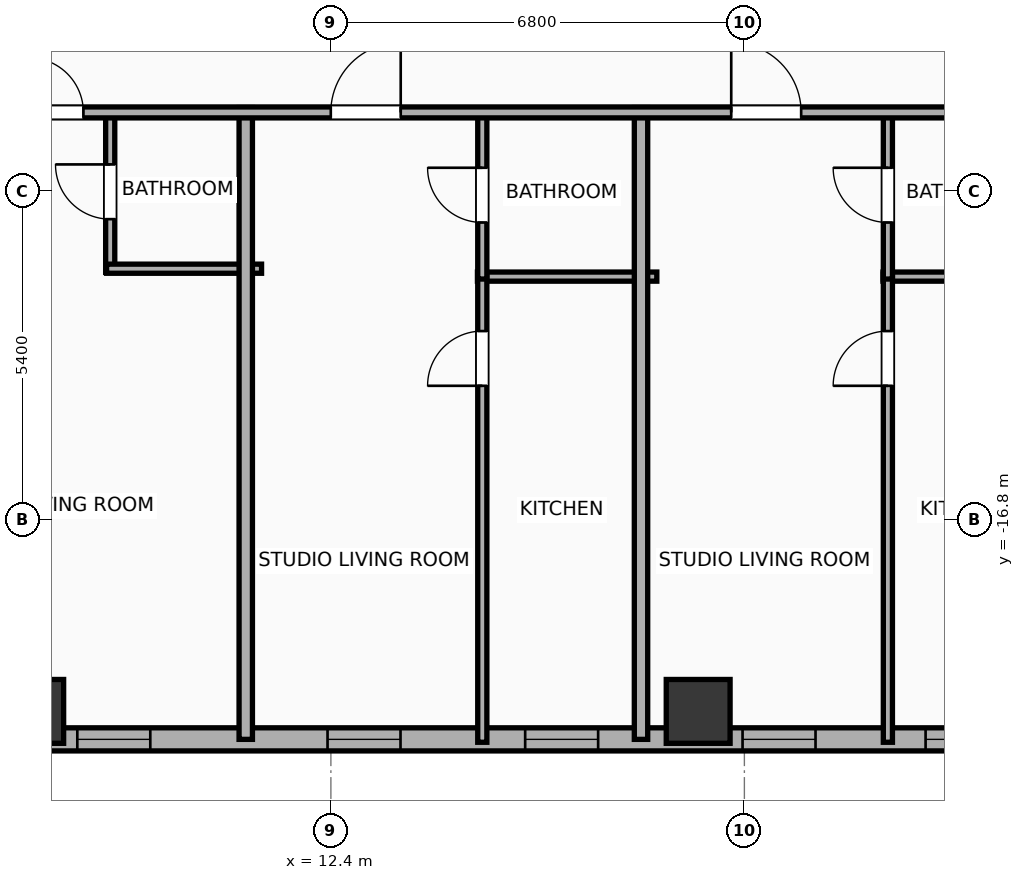
"""IFC4 building model, lengths in metres.
Left out: names, types, materials, properties, quantities, classifications, styles, units other than length and angle.
Written with IfcOpenShell. Run it as: python <this file> out.ifc"""

import sys

from ifc_helpers import new_model, si_unit, direction, frame, frame_2d, origin, origin_2d, place, context, subcontext, project, spatial, rectangle, hollow_rectangle, extrude, element, fill, save


model = new_model("IFC4")
c1 = context("Model", 3, precision=1e-05, world=origin(), true_north=direction((0.0, 1.0)))
c2 = subcontext(c1, "Body", "Model", "MODEL_VIEW")
j1 = project(units=[si_unit("LENGTHUNIT", "METRE"), si_unit("PLANEANGLEUNIT", "RADIAN")], contexts=[c1])
p1 = place(None, origin())
s1 = spatial("IfcSite", under=j1, at=p1, CompositionType="ELEMENT")
p2 = place(p1, origin())
s2 = spatial("IfcBuilding", under=s1, at=p2, CompositionType="ELEMENT")
p3 = place(p2, frame((0.0, 0.0, 128.7)))
s3 = spatial("IfcBuildingStorey", under=s2, at=p3, CompositionType="ELEMENT", Elevation=128.7)
for number, where, z_axis, x_axis in (
    (1, (7.48, -19.95, 0.0), (0.0, 0.0, 1.0), (1.0, 0.0, 0.0)),
    (2, (18.44, -19.95, 0.0), (0.0, 0.0, 1.0), (1.0, 0.0, 0.0)),
):
    element("IfcColumn", number, at=place(p3, frame(where, z_axis=z_axis, x_axis=x_axis)), inside=s3, PredefinedType="COLUMN", context=c2, shape_type="SweptSolid", body=[
        extrude(hollow_rectangle(XDim=1.05, YDim=1.05, WallThickness=0.036, at=origin_2d()), origin(), (0.0, 0.0, 1.0), 3.9),
    ])
p4 = place(p3, frame((29.381, -20.41, 0.0), z_axis=(0.0, 0.0, 1.0), x_axis=(-1.0, 0.0, 0.0)))
e3 = element("IfcWall", 3, at=p4, inside=s3, PredefinedType="ELEMENTEDWALL", context=c2, shape_type="SweptSolid", body=[
    extrude(rectangle(XDim=54.763, YDim=0.38, at=frame_2d((27.381, 0.0))), origin(), (0.0, 0.0, 1.0), 3.65),
])
p5 = place(p4, frame((45.067, 0.0, 0.75)))
e4 = element("IfcOpeningElement", 4, at=p5, cuts=e3, PredefinedType="OPENING", context=c2, shape_type="SweptSolid", body=[
    extrude(rectangle(XDim=2.4, YDim=2.1, at=frame_2d((1.2, 1.05))), frame((0.0, 0.2, 0.0), z_axis=(0.0, -1.0, 0.0), x_axis=(1.0, 0.0, 0.0)), (0.0, 0.0, 1.0), 0.4),
])
p6 = place(p4, frame((51.777, 0.0, 0.75)))
e5 = element("IfcOpeningElement", 5, at=p6, cuts=e3, PredefinedType="OPENING", context=c2, shape_type="SweptSolid", body=[
    extrude(rectangle(XDim=1.2, YDim=2.05, at=frame_2d((0.6, 1.025))), frame((0.0, 0.2, 0.0), z_axis=(0.0, -1.0, 0.0), x_axis=(1.0, 0.0, 0.0)), (0.0, 0.0, 1.0), 0.4),
])
p7 = place(p4, frame((48.976, 0.0, 0.75)))
e6 = element("IfcOpeningElement", 6, at=p7, cuts=e3, PredefinedType="OPENING", context=c2, shape_type="SweptSolid", body=[
    extrude(rectangle(XDim=1.2, YDim=2.05, at=frame_2d((0.6, 1.025))), frame((0.0, 0.2, 0.0), z_axis=(0.0, -1.0, 0.0), x_axis=(1.0, 0.0, 0.0)), (0.0, 0.0, 1.0), 0.4),
])
p8 = place(p4, frame((40.531, 0.0, 0.75)))
e7 = element("IfcOpeningElement", 7, at=p8, cuts=e3, PredefinedType="OPENING", context=c2, shape_type="SweptSolid", body=[
    extrude(rectangle(XDim=1.2, YDim=2.05, at=frame_2d((0.6, 1.025))), frame((0.0, 0.2, 0.0), z_axis=(0.0, -1.0, 0.0), x_axis=(1.0, 0.0, 0.0)), (0.0, 0.0, 1.0), 0.4),
])
p9 = place(p4, frame((33.686, 0.0, 0.75)))
e8 = element("IfcOpeningElement", 8, at=p9, cuts=e3, PredefinedType="OPENING", context=c2, shape_type="SweptSolid", body=[
    extrude(rectangle(XDim=1.2, YDim=2.05, at=frame_2d((0.6, 1.025))), frame((0.0, 0.2, 0.0), z_axis=(0.0, -1.0, 0.0), x_axis=(1.0, 0.0, 0.0)), (0.0, 0.0, 1.0), 0.4),
])
p10 = place(p4, frame((35.976, 0.0, 0.75)))
e9 = element("IfcOpeningElement", 9, at=p10, cuts=e3, PredefinedType="OPENING", context=c2, shape_type="SweptSolid", body=[
    extrude(rectangle(XDim=1.2, YDim=2.05, at=frame_2d((0.6, 1.025))), frame((0.0, 0.2, 0.0), z_axis=(0.0, -1.0, 0.0), x_axis=(1.0, 0.0, 0.0)), (0.0, 0.0, 1.0), 0.4),
])
p11 = place(p4, frame((28.805, 0.0, 0.75)))
e10 = element("IfcOpeningElement", 10, at=p11, cuts=e3, PredefinedType="OPENING", context=c2, shape_type="SweptSolid", body=[
    extrude(rectangle(XDim=1.2, YDim=2.05, at=frame_2d((0.6, 1.025))), frame((0.0, 0.2, 0.0), z_axis=(0.0, -1.0, 0.0), x_axis=(1.0, 0.0, 0.0)), (0.0, 0.0, 1.0), 0.4),
])
p12 = place(p4, frame((25.555, 0.0, 0.75)))
e11 = element("IfcOpeningElement", 11, at=p12, cuts=e3, PredefinedType="OPENING", context=c2, shape_type="SweptSolid", body=[
    extrude(rectangle(XDim=1.2, YDim=2.05, at=frame_2d((0.6, 1.025))), frame((0.0, 0.2, 0.0), z_axis=(0.0, -1.0, 0.0), x_axis=(1.0, 0.0, 0.0)), (0.0, 0.0, 1.0), 0.4),
])
p13 = place(p4, frame((19.951, 0.0, 0.75)))
e12 = element("IfcOpeningElement", 12, at=p13, cuts=e3, PredefinedType="OPENING", context=c2, shape_type="SweptSolid", body=[
    extrude(rectangle(XDim=1.2, YDim=2.05, at=frame_2d((0.6, 1.025))), frame((0.0, 0.2, 0.0), z_axis=(0.0, -1.0, 0.0), x_axis=(1.0, 0.0, 0.0)), (0.0, 0.0, 1.0), 0.4),
])
p14 = place(p4, frame((15.836, 0.0, 0.75)))
e13 = element("IfcOpeningElement", 13, at=p14, cuts=e3, PredefinedType="OPENING", context=c2, shape_type="SweptSolid", body=[
    extrude(rectangle(XDim=1.2, YDim=2.05, at=frame_2d((0.6, 1.025))), frame((0.0, 0.2, 0.0), z_axis=(0.0, -1.0, 0.0), x_axis=(1.0, 0.0, 0.0)), (0.0, 0.0, 1.0), 0.4),
])
p15 = place(p4, frame((12.586, 0.0, 0.75)))
e14 = element("IfcOpeningElement", 14, at=p15, cuts=e3, PredefinedType="OPENING", context=c2, shape_type="SweptSolid", body=[
    extrude(rectangle(XDim=1.2, YDim=2.05, at=frame_2d((0.6, 1.025))), frame((0.0, 0.2, 0.0), z_axis=(0.0, -1.0, 0.0), x_axis=(1.0, 0.0, 0.0)), (0.0, 0.0, 1.0), 0.4),
])
p16 = place(p4, frame((9.011, 0.0, 0.75)))
e15 = element("IfcOpeningElement", 15, at=p16, cuts=e3, PredefinedType="OPENING", context=c2, shape_type="SweptSolid", body=[
    extrude(rectangle(XDim=1.2, YDim=2.05, at=frame_2d((0.6, 1.025))), frame((0.0, 0.2, 0.0), z_axis=(0.0, -1.0, 0.0), x_axis=(1.0, 0.0, 0.0)), (0.0, 0.0, 1.0), 0.4),
])
p17 = place(p4, frame((6.001, 0.0, 0.75)))
e16 = element("IfcOpeningElement", 16, at=p17, cuts=e3, PredefinedType="OPENING", context=c2, shape_type="SweptSolid", body=[
    extrude(rectangle(XDim=1.2, YDim=2.05, at=frame_2d((0.6, 1.025))), frame((0.0, 0.2, 0.0), z_axis=(0.0, -1.0, 0.0), x_axis=(1.0, 0.0, 0.0)), (0.0, 0.0, 1.0), 0.4),
])
p18 = place(p4, frame((2.536, 0.0, 0.75)))
e17 = element("IfcOpeningElement", 17, at=p18, cuts=e3, PredefinedType="OPENING", context=c2, shape_type="SweptSolid", body=[
    extrude(rectangle(XDim=1.2, YDim=2.05, at=frame_2d((0.6, 1.025))), frame((0.0, 0.2, 0.0), z_axis=(0.0, -1.0, 0.0), x_axis=(1.0, 0.0, 0.0)), (0.0, 0.0, 1.0), 0.4),
])
p19 = place(p3, frame((8.771, -12.73, 0.0), z_axis=(0.0, 0.0, 1.0), x_axis=(0.0, 1.0, 0.0)))
e18 = element("IfcWall", 18, at=p19, inside=s3, PredefinedType="PLUMBINGWALL", context=c2, shape_type="SweptSolid", body=[
    extrude(rectangle(XDim=2.65, YDim=0.15, at=frame_2d((1.325, 0.0))), origin(), (0.0, 0.0, 1.0), 3.65),
])
p20 = place(p19, frame((0.875, 0.0, 0.0)))
e19 = element("IfcOpeningElement", 19, at=p20, cuts=e18, PredefinedType="OPENING", context=c2, shape_type="SweptSolid", body=[
    extrude(rectangle(XDim=0.9, YDim=2.05, at=frame_2d((0.45, 1.025))), frame((0.0, 0.085, 0.0), z_axis=(0.0, -1.0, 0.0), x_axis=(1.0, 0.0, 0.0)), (0.0, 0.0, 1.0), 0.17),
])
p21 = place(p3, frame((8.711, -12.67, 0.0), z_axis=(0.0, 0.0, 1.0), x_axis=(1.0, 0.0, 0.0)))
e20 = element("IfcWall", 20, at=p21, inside=s3, PredefinedType="PLUMBINGWALL", context=c2, shape_type="SweptSolid", body=[
    extrude(rectangle(XDim=2.549, YDim=0.15, at=frame_2d((1.274, 0.0))), origin(), (0.0, 0.0, 1.0), 3.65),
])
p22 = place(p3, frame((11.0, -20.41, 0.0), z_axis=(0.0, 0.0, 1.0), x_axis=(0.0, 1.0, 0.0)))
e21 = element("IfcWall", 21, at=p22, inside=s3, PredefinedType="PARTITIONING", context=c2, shape_type="SweptSolid", body=[
    extrude(rectangle(XDim=10.39, YDim=0.22, at=frame_2d((5.195, 0.0))), origin(), (0.0, 0.0, 1.0), 3.65),
])
p23 = place(p3, frame((14.81, -12.8, 0.0), z_axis=(0.0, 0.0, 1.0), x_axis=(1.0, 0.0, 0.0)))
e22 = element("IfcWall", 22, at=p23, inside=s3, PredefinedType="PLUMBINGWALL", context=c2, shape_type="SweptSolid", body=[
    extrude(rectangle(XDim=2.95, YDim=0.15, at=frame_2d((1.475, 0.0))), origin(), (0.0, 0.0, 1.0), 3.65),
])
p24 = place(p3, frame((14.89, -20.458, 0.0), z_axis=(0.0, 0.0, 1.0), x_axis=(0.0, 1.0, 0.0)))
e23 = element("IfcWall", 23, at=p24, inside=s3, PredefinedType="PLUMBINGWALL", context=c2, shape_type="SweptSolid", body=[
    extrude(rectangle(XDim=7.698, YDim=0.15, at=frame_2d((3.849, 0.0))), origin(), (0.0, 0.0, 1.0), 3.65),
])
p25 = place(p24, frame((5.862, 0.0, 0.0)))
e24 = element("IfcOpeningElement", 24, at=p25, cuts=e23, PredefinedType="OPENING", context=c2, shape_type="SweptSolid", body=[
    extrude(rectangle(XDim=0.9, YDim=2.05, at=frame_2d((0.45, 1.025))), frame((0.0, 0.085, 0.0), z_axis=(0.0, -1.0, 0.0), x_axis=(1.0, 0.0, 0.0)), (0.0, 0.0, 1.0), 0.17),
])
p26 = place(p3, frame((14.89, -12.84, 0.0), z_axis=(0.0, 0.0, 1.0), x_axis=(0.0, 1.0, 0.0)))
e25 = element("IfcWall", 25, at=p26, inside=s3, PredefinedType="PLUMBINGWALL", context=c2, shape_type="SweptSolid", body=[
    extrude(rectangle(XDim=2.76, YDim=0.15, at=frame_2d((1.38, 0.0))), origin(), (0.0, 0.0, 1.0), 3.65),
])
p27 = place(p26, frame((0.93, 0.0, 0.0)))
e26 = element("IfcOpeningElement", 26, at=p27, cuts=e25, PredefinedType="OPENING", context=c2, shape_type="SweptSolid", body=[
    extrude(rectangle(XDim=0.9, YDim=2.05, at=frame_2d((0.45, 1.025))), frame((0.0, 0.085, 0.0), z_axis=(0.0, -1.0, 0.0), x_axis=(1.0, 0.0, 0.0)), (0.0, 0.0, 1.0), 0.17),
])
p28 = place(p3, frame((17.5, -20.41, 0.0), z_axis=(0.0, 0.0, 1.0), x_axis=(0.0, 1.0, 0.0)))
e27 = element("IfcWall", 27, at=p28, inside=s3, PredefinedType="PARTITIONING", context=c2, shape_type="SweptSolid", body=[
    extrude(rectangle(XDim=10.39, YDim=0.22, at=frame_2d((5.195, 0.0))), origin(), (0.0, 0.0, 1.0), 3.65),
])
p29 = place(p3, frame((21.48, -12.8, 0.0), z_axis=(0.0, 0.0, 1.0), x_axis=(1.0, 0.0, 0.0)))
e28 = element("IfcWall", 28, at=p29, inside=s3, PredefinedType="PLUMBINGWALL", context=c2, shape_type="SweptSolid", body=[
    extrude(rectangle(XDim=2.78, YDim=0.15, at=frame_2d((1.39, 0.0))), origin(), (0.0, 0.0, 1.0), 3.65),
])
p30 = place(p3, frame((21.56, -20.458, 0.0), z_axis=(0.0, 0.0, 1.0), x_axis=(0.0, 1.0, 0.0)))
e29 = element("IfcWall", 29, at=p30, inside=s3, PredefinedType="PLUMBINGWALL", context=c2, shape_type="SweptSolid", body=[
    extrude(rectangle(XDim=7.698, YDim=0.15, at=frame_2d((3.849, 0.0))), origin(), (0.0, 0.0, 1.0), 3.65),
])
p31 = place(p30, frame((5.862, 0.0, 0.0)))
e30 = element("IfcOpeningElement", 30, at=p31, cuts=e29, PredefinedType="OPENING", context=c2, shape_type="SweptSolid", body=[
    extrude(rectangle(XDim=0.9, YDim=2.05, at=frame_2d((0.45, 1.025))), frame((0.0, 0.085, 0.0), z_axis=(0.0, -1.0, 0.0), x_axis=(1.0, 0.0, 0.0)), (0.0, 0.0, 1.0), 0.17),
])
p32 = place(p3, frame((21.56, -12.84, 0.0), z_axis=(0.0, 0.0, 1.0), x_axis=(0.0, 1.0, 0.0)))
e31 = element("IfcWall", 31, at=p32, inside=s3, PredefinedType="PLUMBINGWALL", context=c2, shape_type="SweptSolid", body=[
    extrude(rectangle(XDim=2.76, YDim=0.15, at=frame_2d((1.38, 0.0))), origin(), (0.0, 0.0, 1.0), 3.65),
])
p33 = place(p32, frame((0.93, 0.0, 0.0)))
e32 = element("IfcOpeningElement", 32, at=p33, cuts=e31, PredefinedType="OPENING", context=c2, shape_type="SweptSolid", body=[
    extrude(rectangle(XDim=0.9, YDim=2.05, at=frame_2d((0.45, 1.025))), frame((0.0, 0.085, 0.0), z_axis=(0.0, -1.0, 0.0), x_axis=(1.0, 0.0, 0.0)), (0.0, 0.0, 1.0), 0.17),
])
p34 = place(p3, frame((-29.21, -10.1, 0.0), z_axis=(0.0, 0.0, 1.0), x_axis=(1.0, 0.0, 0.0)))
e33 = element("IfcWall", 33, at=p34, inside=s3, PredefinedType="PARTITIONING", context=c2, shape_type="SweptSolid", body=[
    extrude(rectangle(XDim=62.42, YDim=0.18, at=frame_2d((31.21, 0.0))), origin(), (0.0, 0.0, 1.0), 3.65),
])
p35 = place(p34, frame((3.414, 0.0, 0.0)))
e34 = element("IfcOpeningElement", 34, at=p35, cuts=e33, PredefinedType="OPENING", context=c2, shape_type="SweptSolid", body=[
    extrude(rectangle(XDim=1.15, YDim=2.05, at=frame_2d((0.575, 1.025))), frame((0.0, 0.1, 0.0), z_axis=(0.0, -1.0, 0.0), x_axis=(1.0, 0.0, 0.0)), (0.0, 0.0, 1.0), 0.2),
])
p36 = place(p34, frame((11.659, 0.0, 0.0)))
e35 = element("IfcOpeningElement", 35, at=p36, cuts=e33, PredefinedType="OPENING", context=c2, shape_type="SweptSolid", body=[
    extrude(rectangle(XDim=1.15, YDim=2.05, at=frame_2d((0.575, 1.025))), frame((0.0, 0.1, 0.0), z_axis=(0.0, -1.0, 0.0), x_axis=(1.0, 0.0, 0.0)), (0.0, 0.0, 1.0), 0.2),
])
p37 = place(p34, frame((17.14, 0.0, 0.0)))
e36 = element("IfcOpeningElement", 36, at=p37, cuts=e33, PredefinedType="OPENING", context=c2, shape_type="SweptSolid", body=[
    extrude(rectangle(XDim=0.9, YDim=2.05, at=frame_2d((0.45, 1.025))), frame((0.0, 0.1, 0.0), z_axis=(0.0, -1.0, 0.0), x_axis=(1.0, 0.0, 0.0)), (0.0, 0.0, 1.0), 0.2),
])
p38 = place(p34, frame((24.661, 0.0, 0.0)))
e37 = element("IfcOpeningElement", 37, at=p38, cuts=e33, PredefinedType="OPENING", context=c2, shape_type="SweptSolid", body=[
    extrude(rectangle(XDim=1.15, YDim=2.05, at=frame_2d((0.575, 1.025))), frame((0.0, 0.1, 0.0), z_axis=(0.0, -1.0, 0.0), x_axis=(1.0, 0.0, 0.0)), (0.0, 0.0, 1.0), 0.2),
])
p39 = place(p34, frame((28.644, 0.0, 0.0)))
e38 = element("IfcOpeningElement", 38, at=p39, cuts=e33, PredefinedType="OPENING", context=c2, shape_type="SweptSolid", body=[
    extrude(rectangle(XDim=1.15, YDim=2.05, at=frame_2d((0.575, 1.025))), frame((0.0, 0.1, 0.0), z_axis=(0.0, -1.0, 0.0), x_axis=(1.0, 0.0, 0.0)), (0.0, 0.0, 1.0), 0.2),
])
p40 = place(p34, frame((36.64, 0.0, 0.0)))
e39 = element("IfcOpeningElement", 39, at=p40, cuts=e33, PredefinedType="OPENING", context=c2, shape_type="SweptSolid", body=[
    extrude(rectangle(XDim=0.9, YDim=2.05, at=frame_2d((0.45, 1.025))), frame((0.0, 0.1, 0.0), z_axis=(0.0, -1.0, 0.0), x_axis=(1.0, 0.0, 0.0)), (0.0, 0.0, 1.0), 0.2),
])
p41 = place(p34, frame((41.608, 0.0, 0.0)))
e40 = element("IfcOpeningElement", 40, at=p41, cuts=e33, PredefinedType="OPENING", context=c2, shape_type="SweptSolid", body=[
    extrude(rectangle(XDim=1.15, YDim=2.05, at=frame_2d((0.575, 1.025))), frame((0.0, 0.1, 0.0), z_axis=(0.0, -1.0, 0.0), x_axis=(1.0, 0.0, 0.0)), (0.0, 0.0, 1.0), 0.2),
])
p42 = place(p34, frame((48.194, 0.0, 0.0)))
e41 = element("IfcOpeningElement", 41, at=p42, cuts=e33, PredefinedType="OPENING", context=c2, shape_type="SweptSolid", body=[
    extrude(rectangle(XDim=1.15, YDim=2.05, at=frame_2d((0.575, 1.025))), frame((0.0, 0.1, 0.0), z_axis=(0.0, -1.0, 0.0), x_axis=(1.0, 0.0, 0.0)), (0.0, 0.0, 1.0), 0.2),
])
p43 = place(p34, frame((57.525, 0.0, 0.0)))
e42 = element("IfcOpeningElement", 42, at=p43, cuts=e33, PredefinedType="OPENING", context=c2, shape_type="SweptSolid", body=[
    extrude(rectangle(XDim=1.15, YDim=2.05, at=frame_2d((0.575, 1.025))), frame((0.0, 0.1, 0.0), z_axis=(0.0, -1.0, 0.0), x_axis=(1.0, 0.0, 0.0)), (0.0, 0.0, 1.0), 0.2),
])
p44 = place(p13, origin())
e43 = element("IfcWindow", 43, at=p44, inside=s3, PartitioningType="SINGLE_PANEL", PredefinedType="WINDOW", context=c2, shape_type="SweptSolid", body=[
    extrude(rectangle(XDim=1.2, YDim=2.05, at=frame_2d((0.6, 1.025))), frame((0.0, 0.03, 0.0), z_axis=(0.0, -1.0, 0.0), x_axis=(1.0, 0.0, 0.0)), (0.0, 0.0, 1.0), 0.06),
])
fill(e12, e43)
p45 = place(p14, origin())
e44 = element("IfcWindow", 44, at=p45, inside=s3, PartitioningType="SINGLE_PANEL", PredefinedType="WINDOW", context=c2, shape_type="SweptSolid", body=[
    extrude(rectangle(XDim=1.2, YDim=2.05, at=frame_2d((0.6, 1.025))), frame((0.0, 0.03, 0.0), z_axis=(0.0, -1.0, 0.0), x_axis=(1.0, 0.0, 0.0)), (0.0, 0.0, 1.0), 0.06),
])
fill(e13, e44)
p46 = place(p15, origin())
e45 = element("IfcWindow", 45, at=p46, inside=s3, PartitioningType="SINGLE_PANEL", PredefinedType="WINDOW", context=c2, shape_type="SweptSolid", body=[
    extrude(rectangle(XDim=1.2, YDim=2.05, at=frame_2d((0.6, 1.025))), frame((0.0, 0.03, 0.0), z_axis=(0.0, -1.0, 0.0), x_axis=(1.0, 0.0, 0.0)), (0.0, 0.0, 1.0), 0.06),
])
fill(e14, e45)
p47 = place(p16, origin())
e46 = element("IfcWindow", 46, at=p47, inside=s3, PartitioningType="SINGLE_PANEL", PredefinedType="WINDOW", context=c2, shape_type="SweptSolid", body=[
    extrude(rectangle(XDim=1.2, YDim=2.05, at=frame_2d((0.6, 1.025))), frame((0.0, 0.03, 0.0), z_axis=(0.0, -1.0, 0.0), x_axis=(1.0, 0.0, 0.0)), (0.0, 0.0, 1.0), 0.06),
])
fill(e15, e46)
p48 = place(p17, origin())
e47 = element("IfcWindow", 47, at=p48, inside=s3, PartitioningType="SINGLE_PANEL", PredefinedType="WINDOW", context=c2, shape_type="SweptSolid", body=[
    extrude(rectangle(XDim=1.2, YDim=2.05, at=frame_2d((0.6, 1.025))), frame((0.0, 0.03, 0.0), z_axis=(0.0, -1.0, 0.0), x_axis=(1.0, 0.0, 0.0)), (0.0, 0.0, 1.0), 0.06),
])
fill(e16, e47)
p49 = place(p20, origin())
e48 = element("IfcDoor", 48, at=p49, inside=s3, OperationType="SINGLE_SWING_RIGHT", PredefinedType="DOOR", context=c2, shape_type="SweptSolid", body=[
    extrude(rectangle(XDim=0.9, YDim=2.05, at=frame_2d((0.45, 1.025))), frame((0.0, 0.025, 0.0), z_axis=(0.0, -1.0, 0.0), x_axis=(1.0, 0.0, 0.0)), (0.0, 0.0, 1.0), 0.05),
])
fill(e19, e48)
p50 = place(p25, origin())
e49 = element("IfcDoor", 49, at=p50, inside=s3, OperationType="SINGLE_SWING_LEFT", PredefinedType="DOOR", context=c2, shape_type="SweptSolid", body=[
    extrude(rectangle(XDim=0.9, YDim=2.05, at=frame_2d((0.45, 1.025))), frame((0.0, 0.025, 0.0), z_axis=(0.0, -1.0, 0.0), x_axis=(1.0, 0.0, 0.0)), (0.0, 0.0, 1.0), 0.05),
])
fill(e24, e49)
p51 = place(p27, origin())
e50 = element("IfcDoor", 50, at=p51, inside=s3, OperationType="SINGLE_SWING_RIGHT", PredefinedType="DOOR", context=c2, shape_type="SweptSolid", body=[
    extrude(rectangle(XDim=0.9, YDim=2.05, at=frame_2d((0.45, 1.025))), frame((0.0, 0.025, 0.0), z_axis=(0.0, -1.0, 0.0), x_axis=(1.0, 0.0, 0.0)), (0.0, 0.0, 1.0), 0.05),
])
fill(e26, e50)
p52 = place(p31, origin())
e51 = element("IfcDoor", 51, at=p52, inside=s3, OperationType="SINGLE_SWING_LEFT", PredefinedType="DOOR", context=c2, shape_type="SweptSolid", body=[
    extrude(rectangle(XDim=0.9, YDim=2.05, at=frame_2d((0.45, 1.025))), frame((0.0, 0.025, 0.0), z_axis=(0.0, -1.0, 0.0), x_axis=(1.0, 0.0, 0.0)), (0.0, 0.0, 1.0), 0.05),
])
fill(e30, e51)
p53 = place(p33, origin())
e52 = element("IfcDoor", 52, at=p53, inside=s3, OperationType="SINGLE_SWING_RIGHT", PredefinedType="DOOR", context=c2, shape_type="SweptSolid", body=[
    extrude(rectangle(XDim=0.9, YDim=2.05, at=frame_2d((0.45, 1.025))), frame((0.0, 0.025, 0.0), z_axis=(0.0, -1.0, 0.0), x_axis=(1.0, 0.0, 0.0)), (0.0, 0.0, 1.0), 0.05),
])
fill(e32, e52)
p54 = place(p40, origin())
e53 = element("IfcDoor", 53, at=p54, inside=s3, OperationType="SINGLE_SWING_LEFT", PredefinedType="DOOR", context=c2, shape_type="SweptSolid", body=[
    extrude(rectangle(XDim=0.9, YDim=2.05, at=frame_2d((0.45, 1.025))), frame((0.0, 0.025, 0.0), z_axis=(0.0, -1.0, 0.0), x_axis=(1.0, 0.0, 0.0)), (0.0, 0.0, 1.0), 0.05),
])
fill(e39, e53)
p55 = place(p41, origin())
e54 = element("IfcDoor", 54, at=p55, inside=s3, OperationType="SINGLE_SWING_RIGHT", PredefinedType="DOOR", context=c2, shape_type="SweptSolid", body=[
    extrude(rectangle(XDim=1.15, YDim=2.05, at=frame_2d((0.575, 1.025))), frame((0.0, 0.025, 0.0), z_axis=(0.0, -1.0, 0.0), x_axis=(1.0, 0.0, 0.0)), (0.0, 0.0, 1.0), 0.05),
])
fill(e40, e54)
p56 = place(p42, origin())
e55 = element("IfcDoor", 55, at=p56, inside=s3, OperationType="SINGLE_SWING_LEFT", PredefinedType="DOOR", context=c2, shape_type="SweptSolid", body=[
    extrude(rectangle(XDim=1.15, YDim=2.05, at=frame_2d((0.575, 1.025))), frame((0.0, 0.025, 0.0), z_axis=(0.0, -1.0, 0.0), x_axis=(1.0, 0.0, 0.0)), (0.0, 0.0, 1.0), 0.05),
])
fill(e41, e55)
save(model, sys.argv[1])
